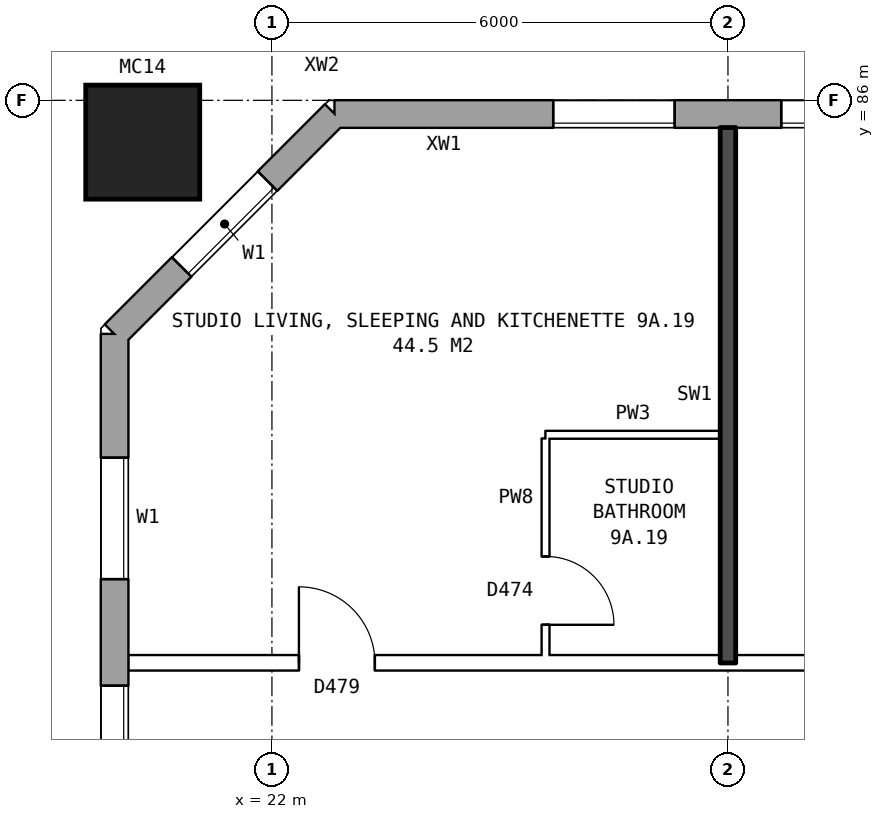
"""IFC4 building model, lengths in metres.
Left out: names, types, materials, properties, quantities, classifications, styles, units other than length and angle.
Written with IfcOpenShell. Run it as: python <this file> out.ifc"""

import sys

from ifc_helpers import new_model, si_unit, direction, frame, frame_2d, origin, origin_2d, place, context, subcontext, project, spatial, rectangle, hollow_rectangle, extrude, element, fill, save


model = new_model("IFC4")
c1 = context("Model", 3, precision=1e-05, world=origin(), true_north=direction((0.0, 1.0)))
c2 = subcontext(c1, "Body", "Model", "MODEL_VIEW")
j1 = project(units=[si_unit("LENGTHUNIT", "METRE"), si_unit("PLANEANGLEUNIT", "RADIAN")], contexts=[c1])
p1 = place(None, origin())
s1 = spatial("IfcSite", under=j1, at=p1, CompositionType="ELEMENT")
p2 = place(p1, origin())
s2 = spatial("IfcBuilding", under=s1, at=p2, CompositionType="ELEMENT")
p3 = place(p2, frame((0.0, 0.0, 35.0)))
s3 = spatial("IfcBuildingStorey", under=s2, at=p3, CompositionType="ELEMENT", Elevation=35.0)
p4 = place(p3, frame((20.3, 85.45, 0.0), z_axis=(0.0, 0.0, 1.0), x_axis=(1.0, 0.0, 0.0)))
e1 = element("IfcColumn", 1, at=p4, inside=s3, PredefinedType="COLUMN", context=c2, shape_type="SweptSolid", body=[
    extrude(hollow_rectangle(XDim=1.5, YDim=1.5, WallThickness=0.08, at=origin_2d()), origin(), (0.0, 0.0, 1.0), 3.1),
])
p5 = place(p3, frame((72.925, 85.82, 0.0), z_axis=(0.0, 0.0, 1.0), x_axis=(-1.0, 0.0, 0.0)))
e2 = element("IfcWall", 2, at=p5, inside=s3, PredefinedType="STANDARD", context=c2, shape_type="SweptSolid", body=[
    extrude(rectangle(XDim=50.101, YDim=0.36, at=frame_2d((25.05, 0.0))), origin(), (0.0, 0.0, 1.0), 2.85),
])
p6 = place(p5, frame((0.625, 0.0, 0.8)))
e3 = element("IfcOpeningElement", 3, at=p6, cuts=e2, PredefinedType="OPENING", context=c2, shape_type="SweptSolid", body=[
    extrude(rectangle(XDim=1.6, YDim=1.8, at=frame_2d((0.8, 0.9))), frame((0.0, 0.19, 0.0), z_axis=(0.0, -1.0, 0.0), x_axis=(1.0, 0.0, 0.0)), (0.0, 0.0, 1.0), 0.38),
])
p7 = place(p5, frame((3.625, 0.0, 0.8)))
e4 = element("IfcOpeningElement", 4, at=p7, cuts=e2, PredefinedType="OPENING", context=c2, shape_type="SweptSolid", body=[
    extrude(rectangle(XDim=1.6, YDim=1.8, at=frame_2d((0.8, 0.9))), frame((0.0, 0.19, 0.0), z_axis=(0.0, -1.0, 0.0), x_axis=(1.0, 0.0, 0.0)), (0.0, 0.0, 1.0), 0.38),
])
p8 = place(p5, frame((6.625, 0.0, 0.8)))
e5 = element("IfcOpeningElement", 5, at=p8, cuts=e2, PredefinedType="OPENING", context=c2, shape_type="SweptSolid", body=[
    extrude(rectangle(XDim=1.6, YDim=1.8, at=frame_2d((0.8, 0.9))), frame((0.0, 0.19, 0.0), z_axis=(0.0, -1.0, 0.0), x_axis=(1.0, 0.0, 0.0)), (0.0, 0.0, 1.0), 0.38),
])
p9 = place(p5, frame((9.625, 0.0, 0.8)))
e6 = element("IfcOpeningElement", 6, at=p9, cuts=e2, PredefinedType="OPENING", context=c2, shape_type="SweptSolid", body=[
    extrude(rectangle(XDim=1.6, YDim=1.8, at=frame_2d((0.8, 0.9))), frame((0.0, 0.19, 0.0), z_axis=(0.0, -1.0, 0.0), x_axis=(1.0, 0.0, 0.0)), (0.0, 0.0, 1.0), 0.38),
])
p10 = place(p5, frame((12.625, 0.0, 0.8)))
e7 = element("IfcOpeningElement", 7, at=p10, cuts=e2, PredefinedType="OPENING", context=c2, shape_type="SweptSolid", body=[
    extrude(rectangle(XDim=1.6, YDim=1.8, at=frame_2d((0.8, 0.9))), frame((0.0, 0.19, 0.0), z_axis=(0.0, -1.0, 0.0), x_axis=(1.0, 0.0, 0.0)), (0.0, 0.0, 1.0), 0.38),
])
p11 = place(p5, frame((15.625, 0.0, 0.8)))
e8 = element("IfcOpeningElement", 8, at=p11, cuts=e2, PredefinedType="OPENING", context=c2, shape_type="SweptSolid", body=[
    extrude(rectangle(XDim=1.6, YDim=1.8, at=frame_2d((0.8, 0.9))), frame((0.0, 0.19, 0.0), z_axis=(0.0, -1.0, 0.0), x_axis=(1.0, 0.0, 0.0)), (0.0, 0.0, 1.0), 0.38),
])
p12 = place(p5, frame((18.625, 0.0, 0.8)))
e9 = element("IfcOpeningElement", 9, at=p12, cuts=e2, PredefinedType="OPENING", context=c2, shape_type="SweptSolid", body=[
    extrude(rectangle(XDim=1.6, YDim=1.8, at=frame_2d((0.8, 0.9))), frame((0.0, 0.19, 0.0), z_axis=(0.0, -1.0, 0.0), x_axis=(1.0, 0.0, 0.0)), (0.0, 0.0, 1.0), 0.38),
])
p13 = place(p5, frame((21.125, 0.0, 1.1)))
e10 = element("IfcOpeningElement", 10, at=p13, cuts=e2, PredefinedType="OPENING", context=c2, shape_type="SweptSolid", body=[
    extrude(rectangle(XDim=0.8, YDim=1.5, at=frame_2d((0.4, 0.75))), frame((0.0, 0.19, 0.0), z_axis=(0.0, -1.0, 0.0), x_axis=(1.0, 0.0, 0.0)), (0.0, 0.0, 1.0), 0.38),
])
p14 = place(p5, frame((24.175, 0.0, 0.15)))
e11 = element("IfcOpeningElement", 11, at=p14, cuts=e2, PredefinedType="OPENING", context=c2, shape_type="SweptSolid", body=[
    extrude(rectangle(XDim=1.6, YDim=1.5, at=frame_2d((0.8, 0.75))), frame((0.0, 0.19, 0.0), z_axis=(0.0, -1.0, 0.0), x_axis=(1.0, 0.0, 0.0)), (0.0, 0.0, 1.0), 0.38),
])
p15 = place(p5, frame((27.275, 0.0, 1.7)))
e12 = element("IfcOpeningElement", 12, at=p15, cuts=e2, PredefinedType="OPENING", context=c2, shape_type="SweptSolid", body=[
    extrude(rectangle(XDim=1.2, YDim=0.9, at=frame_2d((0.6, 0.45))), frame((0.0, 0.19, 0.0), z_axis=(0.0, -1.0, 0.0), x_axis=(1.0, 0.0, 0.0)), (0.0, 0.0, 1.0), 0.38),
])
p16 = place(p5, frame((30.625, 0.0, 0.8)))
e13 = element("IfcOpeningElement", 13, at=p16, cuts=e2, PredefinedType="OPENING", context=c2, shape_type="SweptSolid", body=[
    extrude(rectangle(XDim=1.6, YDim=1.8, at=frame_2d((0.8, 0.9))), frame((0.0, 0.19, 0.0), z_axis=(0.0, -1.0, 0.0), x_axis=(1.0, 0.0, 0.0)), (0.0, 0.0, 1.0), 0.38),
])
p17 = place(p5, frame((33.625, 0.0, 0.8)))
e14 = element("IfcOpeningElement", 14, at=p17, cuts=e2, PredefinedType="OPENING", context=c2, shape_type="SweptSolid", body=[
    extrude(rectangle(XDim=1.6, YDim=1.8, at=frame_2d((0.8, 0.9))), frame((0.0, 0.19, 0.0), z_axis=(0.0, -1.0, 0.0), x_axis=(1.0, 0.0, 0.0)), (0.0, 0.0, 1.0), 0.38),
])
p18 = place(p5, frame((36.625, 0.0, 0.8)))
e15 = element("IfcOpeningElement", 15, at=p18, cuts=e2, PredefinedType="OPENING", context=c2, shape_type="SweptSolid", body=[
    extrude(rectangle(XDim=1.6, YDim=1.8, at=frame_2d((0.8, 0.9))), frame((0.0, 0.19, 0.0), z_axis=(0.0, -1.0, 0.0), x_axis=(1.0, 0.0, 0.0)), (0.0, 0.0, 1.0), 0.38),
])
p19 = place(p5, frame((39.625, 0.0, 0.8)))
e16 = element("IfcOpeningElement", 16, at=p19, cuts=e2, PredefinedType="OPENING", context=c2, shape_type="SweptSolid", body=[
    extrude(rectangle(XDim=1.6, YDim=1.8, at=frame_2d((0.8, 0.9))), frame((0.0, 0.19, 0.0), z_axis=(0.0, -1.0, 0.0), x_axis=(1.0, 0.0, 0.0)), (0.0, 0.0, 1.0), 0.38),
])
p20 = place(p5, frame((42.625, 0.0, 0.8)))
e17 = element("IfcOpeningElement", 17, at=p20, cuts=e2, PredefinedType="OPENING", context=c2, shape_type="SweptSolid", body=[
    extrude(rectangle(XDim=1.6, YDim=1.8, at=frame_2d((0.8, 0.9))), frame((0.0, 0.19, 0.0), z_axis=(0.0, -1.0, 0.0), x_axis=(1.0, 0.0, 0.0)), (0.0, 0.0, 1.0), 0.38),
])
p21 = place(p5, frame((45.625, 0.0, 0.8)))
e18 = element("IfcOpeningElement", 18, at=p21, cuts=e2, PredefinedType="OPENING", context=c2, shape_type="SweptSolid", body=[
    extrude(rectangle(XDim=1.6, YDim=1.8, at=frame_2d((0.8, 0.9))), frame((0.0, 0.19, 0.0), z_axis=(0.0, -1.0, 0.0), x_axis=(1.0, 0.0, 0.0)), (0.0, 0.0, 1.0), 0.38),
])
p22 = place(p5, frame((22.225, 0.0, 1.7)))
e19 = element("IfcOpeningElement", 19, at=p22, cuts=e2, PredefinedType="OPENING", context=c2, shape_type="SweptSolid", body=[
    extrude(rectangle(XDim=0.6, YDim=0.9, at=frame_2d((0.3, 0.45))), frame((0.0, 0.19, 0.0), z_axis=(0.0, -1.0, 0.0), x_axis=(1.0, 0.0, 0.0)), (0.0, 0.0, 1.0), 0.38),
])
p23 = place(p5, frame((26.075, 0.0, 0.25)))
e20 = element("IfcOpeningElement", 20, at=p23, cuts=e2, PredefinedType="OPENING", context=c2, shape_type="SweptSolid", body=[
    extrude(rectangle(XDim=0.6, YDim=0.9, at=frame_2d((0.3, 0.45))), frame((0.0, 0.19, 0.0), z_axis=(0.0, -1.0, 0.0), x_axis=(1.0, 0.0, 0.0)), (0.0, 0.0, 1.0), 0.38),
])
p24 = place(p5, frame((28.775, 0.0, 0.8)))
e21 = element("IfcOpeningElement", 21, at=p24, cuts=e2, PredefinedType="OPENING", context=c2, shape_type="SweptSolid", body=[
    extrude(rectangle(XDim=1.4, YDim=1.8, at=frame_2d((0.7, 0.9))), frame((0.0, 0.19, 0.0), z_axis=(0.0, -1.0, 0.0), x_axis=(1.0, 0.0, 0.0)), (0.0, 0.0, 1.0), 0.38),
])
p25 = place(p3, frame((22.825, 85.82, 0.0), z_axis=(0.0, 0.0, 1.0), x_axis=(-0.707106781187, -0.707106781187, 0.0)))
e22 = element("IfcWall", 22, at=p25, inside=s3, PredefinedType="STANDARD", context=c2, shape_type="SweptSolid", body=[
    extrude(rectangle(XDim=4.094, YDim=0.36, at=frame_2d((2.047, 0.0))), origin(), (0.0, 0.0, 1.0), 2.85),
])
p26 = place(p25, frame((1.247, 0.0, 0.8)))
e23 = element("IfcOpeningElement", 23, at=p26, cuts=e22, PredefinedType="OPENING", context=c2, shape_type="SweptSolid", body=[
    extrude(rectangle(XDim=1.6, YDim=1.8, at=frame_2d((0.8, 0.9))), frame((0.0, 0.19, 0.0), z_axis=(0.0, -1.0, 0.0), x_axis=(1.0, 0.0, 0.0)), (0.0, 0.0, 1.0), 0.38),
])
p27 = place(p3, frame((19.93, 82.925, 0.0), z_axis=(0.0, 0.0, 1.0), x_axis=(0.0, -1.0, 0.0)))
e24 = element("IfcWall", 24, at=p27, inside=s3, PredefinedType="STANDARD", context=c2, shape_type="SweptSolid", body=[
    extrude(rectangle(XDim=25.851, YDim=0.36, at=frame_2d((12.925, 0.0))), origin(), (0.0, 0.0, 1.0), 2.85),
])
p28 = place(p27, frame((1.625, 0.0, 0.8)))
e25 = element("IfcOpeningElement", 25, at=p28, cuts=e24, PredefinedType="OPENING", context=c2, shape_type="SweptSolid", body=[
    extrude(rectangle(XDim=1.6, YDim=1.8, at=frame_2d((0.8, 0.9))), frame((0.0, 0.19, 0.0), z_axis=(0.0, -1.0, 0.0), x_axis=(1.0, 0.0, 0.0)), (0.0, 0.0, 1.0), 0.38),
])
p29 = place(p27, frame((4.625, 0.0, 0.8)))
e26 = element("IfcOpeningElement", 26, at=p29, cuts=e24, PredefinedType="OPENING", context=c2, shape_type="SweptSolid", body=[
    extrude(rectangle(XDim=1.6, YDim=1.8, at=frame_2d((0.8, 0.9))), frame((0.0, 0.19, 0.0), z_axis=(0.0, -1.0, 0.0), x_axis=(1.0, 0.0, 0.0)), (0.0, 0.0, 1.0), 0.38),
])
p30 = place(p27, frame((7.625, 0.0, 0.8)))
e27 = element("IfcOpeningElement", 27, at=p30, cuts=e24, PredefinedType="OPENING", context=c2, shape_type="SweptSolid", body=[
    extrude(rectangle(XDim=1.6, YDim=1.8, at=frame_2d((0.8, 0.9))), frame((0.0, 0.19, 0.0), z_axis=(0.0, -1.0, 0.0), x_axis=(1.0, 0.0, 0.0)), (0.0, 0.0, 1.0), 0.38),
])
p31 = place(p27, frame((10.625, 0.0, 0.8)))
e28 = element("IfcOpeningElement", 28, at=p31, cuts=e24, PredefinedType="OPENING", context=c2, shape_type="SweptSolid", body=[
    extrude(rectangle(XDim=1.6, YDim=1.8, at=frame_2d((0.8, 0.9))), frame((0.0, 0.19, 0.0), z_axis=(0.0, -1.0, 0.0), x_axis=(1.0, 0.0, 0.0)), (0.0, 0.0, 1.0), 0.38),
])
p32 = place(p27, frame((13.625, 0.0, 0.8)))
e29 = element("IfcOpeningElement", 29, at=p32, cuts=e24, PredefinedType="OPENING", context=c2, shape_type="SweptSolid", body=[
    extrude(rectangle(XDim=1.6, YDim=1.8, at=frame_2d((0.8, 0.9))), frame((0.0, 0.19, 0.0), z_axis=(0.0, -1.0, 0.0), x_axis=(1.0, 0.0, 0.0)), (0.0, 0.0, 1.0), 0.38),
])
p33 = place(p27, frame((16.625, 0.0, 0.8)))
e30 = element("IfcOpeningElement", 30, at=p33, cuts=e24, PredefinedType="OPENING", context=c2, shape_type="SweptSolid", body=[
    extrude(rectangle(XDim=1.6, YDim=1.8, at=frame_2d((0.8, 0.9))), frame((0.0, 0.19, 0.0), z_axis=(0.0, -1.0, 0.0), x_axis=(1.0, 0.0, 0.0)), (0.0, 0.0, 1.0), 0.38),
])
p34 = place(p27, frame((19.625, 0.0, 0.8)))
e31 = element("IfcOpeningElement", 31, at=p34, cuts=e24, PredefinedType="OPENING", context=c2, shape_type="SweptSolid", body=[
    extrude(rectangle(XDim=1.6, YDim=1.8, at=frame_2d((0.8, 0.9))), frame((0.0, 0.19, 0.0), z_axis=(0.0, -1.0, 0.0), x_axis=(1.0, 0.0, 0.0)), (0.0, 0.0, 1.0), 0.38),
])
p35 = place(p27, frame((22.625, 0.0, 0.8)))
e32 = element("IfcOpeningElement", 32, at=p35, cuts=e24, PredefinedType="OPENING", context=c2, shape_type="SweptSolid", body=[
    extrude(rectangle(XDim=1.6, YDim=1.8, at=frame_2d((0.8, 0.9))), frame((0.0, 0.19, 0.0), z_axis=(0.0, -1.0, 0.0), x_axis=(1.0, 0.0, 0.0)), (0.0, 0.0, 1.0), 0.38),
])
p36 = place(p3, frame((20.11, 78.6, 0.0), z_axis=(0.0, 0.0, 1.0), x_axis=(1.0, 0.0, 0.0)))
e33 = element("IfcWall", 33, at=p36, inside=s3, PredefinedType="PARTITIONING", context=c2, shape_type="SweptSolid", body=[
    extrude(rectangle(XDim=25.79, YDim=0.2, at=frame_2d((12.895, 0.0))), origin(), (0.0, 0.0, 1.0), 2.85),
])
p37 = place(p36, frame((22.34, 0.0, 0.0)))
e34 = element("IfcOpeningElement", 34, at=p37, cuts=e33, PredefinedType="OPENING", context=c2, shape_type="SweptSolid", body=[
    extrude(rectangle(XDim=1.0, YDim=2.1, at=frame_2d((0.5, 1.05))), frame((0.0, 0.11, 0.0), z_axis=(0.0, -1.0, 0.0), x_axis=(1.0, 0.0, 0.0)), (0.0, 0.0, 1.0), 0.22),
])
p38 = place(p36, frame((10.39, 0.0, 0.0)))
e35 = element("IfcOpeningElement", 35, at=p38, cuts=e33, PredefinedType="OPENING", context=c2, shape_type="SweptSolid", body=[
    extrude(rectangle(XDim=1.0, YDim=2.1, at=frame_2d((0.5, 1.05))), frame((0.0, 0.11, 0.0), z_axis=(0.0, -1.0, 0.0), x_axis=(1.0, 0.0, 0.0)), (0.0, 0.0, 1.0), 0.22),
])
p39 = place(p36, frame((2.245, 0.0, 0.0)))
e36 = element("IfcOpeningElement", 36, at=p39, cuts=e33, PredefinedType="OPENING", context=c2, shape_type="SweptSolid", body=[
    extrude(rectangle(XDim=1.0, YDim=2.1, at=frame_2d((0.5, 1.05))), frame((0.0, 0.11, 0.0), z_axis=(0.0, -1.0, 0.0), x_axis=(1.0, 0.0, 0.0)), (0.0, 0.0, 1.0), 0.22),
])
p40 = place(p3, frame((25.6, 81.6, 0.0), z_axis=(0.0, 0.0, 1.0), x_axis=(1.0, 0.0, 0.0)))
e37 = element("IfcWall", 37, at=p40, inside=s3, PredefinedType="PARTITIONING", context=c2, shape_type="SweptSolid", body=[
    extrude(rectangle(XDim=2.3, YDim=0.1, at=frame_2d((1.15, 0.0))), origin(), (0.0, 0.0, 1.0), 2.85),
])
p41 = place(p3, frame((25.6, 78.7, 0.0), z_axis=(0.0, 0.0, 1.0), x_axis=(0.0, 1.0, 0.0)))
e38 = element("IfcWall", 38, at=p41, inside=s3, PredefinedType="PARTITIONING", context=c2, shape_type="SweptSolid", body=[
    extrude(rectangle(XDim=2.85, YDim=0.1, at=frame_2d((1.425, 0.0))), origin(), (0.0, 0.0, 1.0), 2.85),
])
p42 = place(p41, frame((0.4, 0.0, 0.0)))
e39 = element("IfcOpeningElement", 39, at=p42, cuts=e38, PredefinedType="OPENING", context=c2, shape_type="SweptSolid", body=[
    extrude(rectangle(XDim=0.9, YDim=2.1, at=frame_2d((0.45, 1.05))), frame((0.0, 0.06, 0.0), z_axis=(0.0, -1.0, 0.0), x_axis=(1.0, 0.0, 0.0)), (0.0, 0.0, 1.0), 0.12),
])
p43 = place(p3, frame((28.0, 78.6, 0.0), z_axis=(0.0, 0.0, 1.0), x_axis=(0.0, 1.0, 0.0)))
e40 = element("IfcWall", 40, at=p43, inside=s3, PredefinedType="SOLIDWALL", context=c2, shape_type="SweptSolid", body=[
    extrude(rectangle(XDim=7.04, YDim=0.2, at=frame_2d((3.52, 0.0))), origin(), (0.0, 0.0, 1.0), 2.85),
])
p44 = place(p20, origin())
e41 = element("IfcWindow", 41, at=p44, inside=s3, PartitioningType="SINGLE_PANEL", PredefinedType="WINDOW", context=c2, shape_type="SweptSolid", body=[
    extrude(rectangle(XDim=1.6, YDim=1.8, at=frame_2d((0.8, 0.9))), frame((0.0, 0.15, 0.0), z_axis=(0.0, -1.0, 0.0), x_axis=(1.0, 0.0, 0.0)), (0.0, 0.0, 1.0), 0.06),
])
fill(e17, e41)
p45 = place(p21, origin())
e42 = element("IfcWindow", 42, at=p45, inside=s3, PartitioningType="SINGLE_PANEL", PredefinedType="WINDOW", context=c2, shape_type="SweptSolid", body=[
    extrude(rectangle(XDim=1.6, YDim=1.8, at=frame_2d((0.8, 0.9))), frame((0.0, 0.15, 0.0), z_axis=(0.0, -1.0, 0.0), x_axis=(1.0, 0.0, 0.0)), (0.0, 0.0, 1.0), 0.06),
])
fill(e18, e42)
p46 = place(p26, origin())
e43 = element("IfcWindow", 43, at=p46, inside=s3, PartitioningType="SINGLE_PANEL", PredefinedType="WINDOW", context=c2, shape_type="SweptSolid", body=[
    extrude(rectangle(XDim=1.6, YDim=1.8, at=frame_2d((0.8, 0.9))), frame((0.0, 0.15, 0.0), z_axis=(0.0, -1.0, 0.0), x_axis=(1.0, 0.0, 0.0)), (0.0, 0.0, 1.0), 0.06),
])
fill(e23, e43)
p47 = place(p28, origin())
e44 = element("IfcWindow", 44, at=p47, inside=s3, PartitioningType="SINGLE_PANEL", PredefinedType="WINDOW", context=c2, shape_type="SweptSolid", body=[
    extrude(rectangle(XDim=1.6, YDim=1.8, at=frame_2d((0.8, 0.9))), frame((0.0, 0.15, 0.0), z_axis=(0.0, -1.0, 0.0), x_axis=(1.0, 0.0, 0.0)), (0.0, 0.0, 1.0), 0.06),
])
fill(e25, e44)
p48 = place(p29, origin())
e45 = element("IfcWindow", 45, at=p48, inside=s3, PartitioningType="SINGLE_PANEL", PredefinedType="WINDOW", context=c2, shape_type="SweptSolid", body=[
    extrude(rectangle(XDim=1.6, YDim=1.8, at=frame_2d((0.8, 0.9))), frame((0.0, 0.15, 0.0), z_axis=(0.0, -1.0, 0.0), x_axis=(1.0, 0.0, 0.0)), (0.0, 0.0, 1.0), 0.06),
])
fill(e26, e45)
p49 = place(p39, origin())
e46 = element("IfcDoor", 46, at=p49, inside=s3, OperationType="SINGLE_SWING_LEFT", PredefinedType="DOOR", context=c2, shape_type="SweptSolid", body=[
    extrude(rectangle(XDim=1.0, YDim=2.1, at=frame_2d((0.5, 1.05))), frame((0.0, 0.025, 0.0), z_axis=(0.0, -1.0, 0.0), x_axis=(1.0, 0.0, 0.0)), (0.0, 0.0, 1.0), 0.05),
])
fill(e36, e46)
p50 = place(p42, frame((0.9, 0.0, 0.0), z_axis=(0.0, 0.0, 1.0), x_axis=(-1.0, 0.0, 0.0)))
e47 = element("IfcDoor", 47, at=p50, inside=s3, OperationType="SINGLE_SWING_RIGHT", PredefinedType="DOOR", context=c2, shape_type="SweptSolid", body=[
    extrude(rectangle(XDim=0.9, YDim=2.1, at=frame_2d((0.45, 1.05))), frame((0.0, 0.025, 0.0), z_axis=(0.0, -1.0, 0.0), x_axis=(1.0, 0.0, 0.0)), (0.0, 0.0, 1.0), 0.05),
])
fill(e39, e47)
save(model, sys.argv[1])
